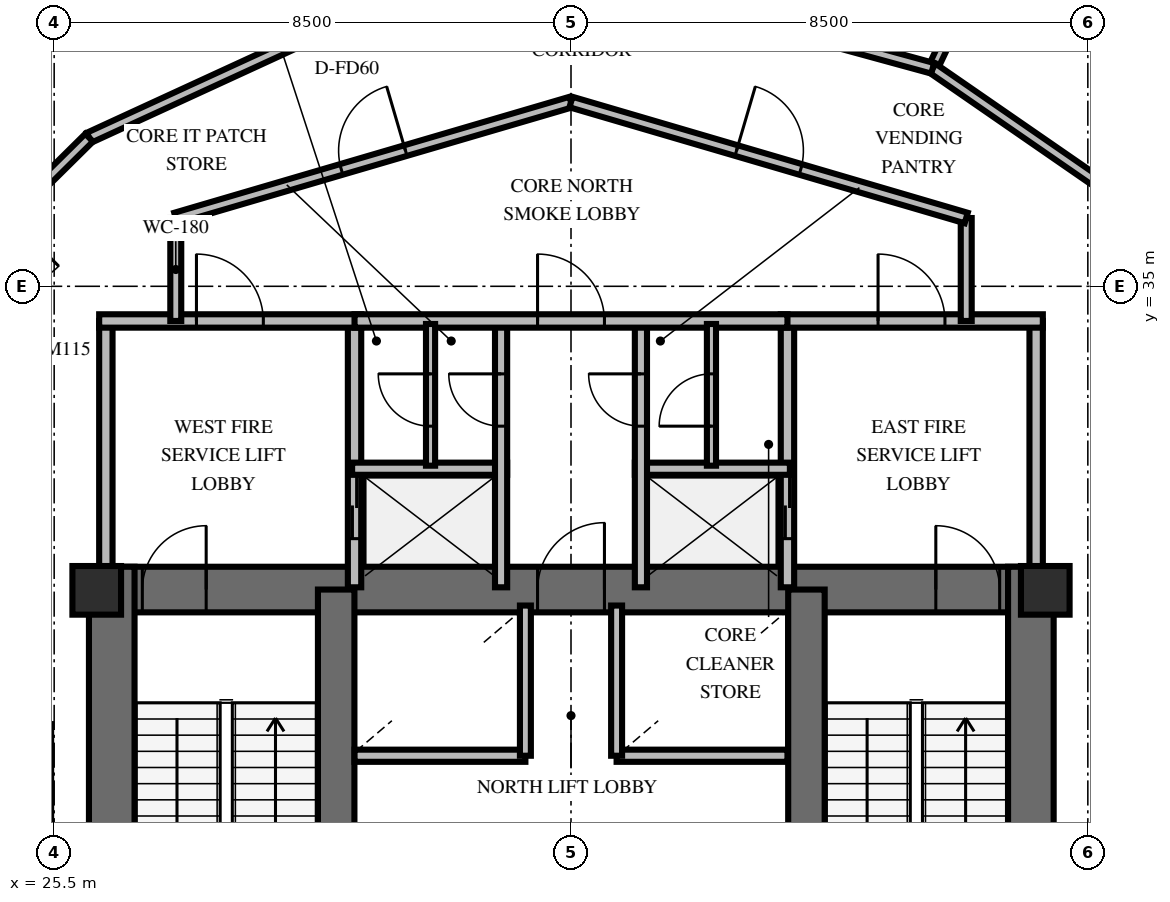
"""IFC4 building model, lengths in metres.
Left out: names, types, materials, properties, quantities, classifications, styles, units other than length and angle.
Written with IfcOpenShell. Run it as: python <this file> out.ifc"""

import sys

from ifc_helpers import new_model, si_unit, direction, frame, frame_2d, origin, origin_2d, place, context, subcontext, project, spatial, rectangle, extrude, element, fill, save


model = new_model("IFC4")
c1 = context("Model", 3, precision=1e-05, world=origin(), true_north=direction((0.0, 1.0)))
c2 = subcontext(c1, "Body", "Model", "MODEL_VIEW")
j1 = project(units=[si_unit("LENGTHUNIT", "METRE"), si_unit("PLANEANGLEUNIT", "RADIAN")], contexts=[c1])
p1 = place(None, origin())
s1 = spatial("IfcSite", under=j1, at=p1, CompositionType="ELEMENT")
p2 = place(p1, origin())
s2 = spatial("IfcBuilding", under=s1, at=p2, CompositionType="ELEMENT")
p3 = place(p2, frame((0.0, 0.0, 137.8)))
s3 = spatial("IfcBuildingStorey", under=s2, at=p3, CompositionType="ELEMENT", Elevation=137.8)
p4 = place(p3, frame((26.072, 30.013, 0.0), z_axis=(0.0, 0.0, 1.0), x_axis=(1.0, 0.0, 0.0)))
e1 = element("IfcWall", 1, at=p4, inside=s3, PredefinedType="SHEAR", context=c2, shape_type="SweptSolid", body=[
    extrude(rectangle(XDim=15.866, YDim=0.75, at=frame_2d((7.933, 0.0))), origin(), (0.0, 0.0, 1.0), 4.0),
])
p5 = place(p4, frame((0.878, 0.0, 0.0)))
e2 = element("IfcOpeningElement", 2, at=p5, cuts=e1, PredefinedType="OPENING", context=c2, shape_type="SweptSolid", body=[
    extrude(rectangle(XDim=1.05, YDim=2.15, at=frame_2d((0.525, 1.075))), frame((0.0, 0.385, 0.0), z_axis=(0.0, -1.0, 0.0), x_axis=(1.0, 0.0, 0.0)), (0.0, 0.0, 1.0), 0.77),
])
p6 = place(p4, frame((13.928, 0.0, 0.0)))
e3 = element("IfcOpeningElement", 3, at=p6, cuts=e1, PredefinedType="OPENING", context=c2, shape_type="SweptSolid", body=[
    extrude(rectangle(XDim=1.05, YDim=2.15, at=frame_2d((0.525, 1.075))), frame((0.0, 0.385, 0.0), z_axis=(0.0, -1.0, 0.0), x_axis=(1.0, 0.0, 0.0)), (0.0, 0.0, 1.0), 0.77),
])
p7 = place(p4, frame((7.378, 0.0, 0.0)))
e4 = element("IfcOpeningElement", 4, at=p7, cuts=e1, PredefinedType="OPENING", context=c2, shape_type="SweptSolid", body=[
    extrude(rectangle(XDim=1.1, YDim=2.15, at=frame_2d((0.55, 1.075))), frame((0.0, 0.385, 0.0), z_axis=(0.0, -1.0, 0.0), x_axis=(1.0, 0.0, 0.0)), (0.0, 0.0, 1.0), 0.77),
])
for number, where, z_axis, x_axis in (
    (5, (26.447, 19.812, 0.0), (0.0, 0.0, 1.0), (0.0, 1.0, 0.0)),
    (6, (41.563, 19.812, 0.0), (0.0, 0.0, 1.0), (0.0, 1.0, 0.0)),
):
    element("IfcWall", number, at=place(p3, frame(where, z_axis=z_axis, x_axis=x_axis)), inside=s3, PredefinedType="SHEAR", context=c2, shape_type="SweptSolid", body=[
        extrude(rectangle(XDim=10.576, YDim=0.75, at=frame_2d((5.288, 0.0))), origin(), (0.0, 0.0, 1.0), 4.0),
    ])
for number, where, z_axis, x_axis in (
    (7, (30.138, 20.187, 0.0), (0.0, 0.0, 1.0), (0.0, 1.0, 0.0)),
    (8, (37.872, 20.187, 0.0), (0.0, 0.0, 1.0), (0.0, 1.0, 0.0)),
):
    element("IfcWall", number, at=place(p3, frame(where, z_axis=z_axis, x_axis=x_axis)), inside=s3, PredefinedType="SHEAR", context=c2, shape_type="SweptSolid", body=[
        extrude(rectangle(XDim=9.826, YDim=0.6, at=frame_2d((4.913, 0.0))), origin(), (0.0, 0.0, 1.0), 4.0),
    ])
for number, where, z_axis, x_axis in (
    (9, (26.2, 30.0, 0.0), (0.0, 0.0, 1.0), (1.0, 0.0, 0.0)),
    (10, (41.8, 30.0, 0.0), (0.0, 0.0, 1.0), (1.0, 0.0, 0.0)),
):
    element("IfcColumn", number, at=place(p3, frame(where, z_axis=z_axis, x_axis=x_axis)), inside=s3, PredefinedType="PILASTER", context=c2, shape_type="SweptSolid", body=[
        extrude(rectangle(XDim=0.8, YDim=0.8, at=origin_2d()), origin(), (0.0, 0.0, 1.0), 4.0),
    ])
p8 = place(p3, frame((26.35, 30.05, 0.0), z_axis=(0.0, 0.0, 1.0), x_axis=(0.0, 1.0, 0.0)))
e11 = element("IfcWall", 11, at=p8, inside=s3, PredefinedType="SOLIDWALL", context=c2, shape_type="SweptSolid", body=[
    extrude(rectangle(XDim=4.38, YDim=0.22, at=frame_2d((2.19, 0.0))), origin(), (0.0, 0.0, 1.0), 2.8),
])
p9 = place(p3, frame((30.44, 30.05, 0.0), z_axis=(0.0, 0.0, 1.0), x_axis=(0.0, 1.0, 0.0)))
e12 = element("IfcWall", 12, at=p9, inside=s3, PredefinedType="SOLIDWALL", context=c2, shape_type="SweptSolid", body=[
    extrude(rectangle(XDim=4.38, YDim=0.22, at=frame_2d((2.19, 0.0))), origin(), (0.0, 0.0, 1.0), 2.8),
])
p10 = place(p9, frame((0.8, 0.0, 0.0)))
e13 = element("IfcOpeningElement", 13, at=p10, cuts=e12, PredefinedType="OPENING", context=c2, shape_type="SweptSolid", body=[
    extrude(rectangle(XDim=1.05, YDim=2.1, at=frame_2d((0.525, 1.05))), frame((0.0, 0.12, 0.0), z_axis=(0.0, -1.0, 0.0), x_axis=(1.0, 0.0, 0.0)), (0.0, 0.0, 1.0), 0.24),
])
p11 = place(p3, frame((26.24, 34.43, 0.0), z_axis=(0.0, 0.0, 1.0), x_axis=(1.0, 0.0, 0.0)))
e14 = element("IfcWall", 14, at=p11, inside=s3, PredefinedType="SOLIDWALL", context=c2, shape_type="SweptSolid", body=[
    extrude(rectangle(XDim=4.31, YDim=0.22, at=frame_2d((2.155, 0.0))), origin(), (0.0, 0.0, 1.0), 2.8),
])
p12 = place(p11, frame((1.6, 0.0, 0.0)))
e15 = element("IfcOpeningElement", 15, at=p12, cuts=e14, PredefinedType="OPENING", context=c2, shape_type="SweptSolid", body=[
    extrude(rectangle(XDim=1.1, YDim=2.15, at=frame_2d((0.55, 1.075))), frame((0.0, 0.12, 0.0), z_axis=(0.0, -1.0, 0.0), x_axis=(1.0, 0.0, 0.0)), (0.0, 0.0, 1.0), 0.24),
])
p13 = place(p3, frame((30.4, 32.0, 0.0), z_axis=(0.0, 0.0, 1.0), x_axis=(1.0, 0.0, 0.0)))
e16 = element("IfcWall", 16, at=p13, inside=s3, PredefinedType="SOLIDWALL", context=c2, shape_type="SweptSolid", body=[
    extrude(rectangle(XDim=2.55, YDim=0.2, at=frame_2d((1.275, 0.0))), origin(), (0.0, 0.0, 1.0), 2.8),
])
p14 = place(p3, frame((32.85, 30.05, 0.0), z_axis=(0.0, 0.0, 1.0), x_axis=(0.0, 1.0, 0.0)))
e17 = element("IfcWall", 17, at=p14, inside=s3, PredefinedType="SOLIDWALL", context=c2, shape_type="SweptSolid", body=[
    extrude(rectangle(XDim=4.38, YDim=0.2, at=frame_2d((2.19, 0.0))), origin(), (0.0, 0.0, 1.0), 2.8),
])
p15 = place(p14, frame((2.65, 0.0, 0.0)))
e18 = element("IfcOpeningElement", 18, at=p15, cuts=e17, PredefinedType="OPENING", context=c2, shape_type="SweptSolid", body=[
    extrude(rectangle(XDim=0.86, YDim=2.05, at=frame_2d((0.43, 1.025))), frame((0.0, 0.11, 0.0), z_axis=(0.0, -1.0, 0.0), x_axis=(1.0, 0.0, 0.0)), (0.0, 0.0, 1.0), 0.22),
])
p16 = place(p3, frame((37.56, 30.05, 0.0), z_axis=(0.0, 0.0, 1.0), x_axis=(0.0, 1.0, 0.0)))
e19 = element("IfcWall", 19, at=p16, inside=s3, PredefinedType="SOLIDWALL", context=c2, shape_type="SweptSolid", body=[
    extrude(rectangle(XDim=4.38, YDim=0.22, at=frame_2d((2.19, 0.0))), origin(), (0.0, 0.0, 1.0), 2.8),
])
p17 = place(p16, frame((0.8, 0.0, 0.0)))
e20 = element("IfcOpeningElement", 20, at=p17, cuts=e19, PredefinedType="OPENING", context=c2, shape_type="SweptSolid", body=[
    extrude(rectangle(XDim=1.05, YDim=2.1, at=frame_2d((0.525, 1.05))), frame((0.0, 0.12, 0.0), z_axis=(0.0, -1.0, 0.0), x_axis=(1.0, 0.0, 0.0)), (0.0, 0.0, 1.0), 0.24),
])
p18 = place(p3, frame((41.65, 30.05, 0.0), z_axis=(0.0, 0.0, 1.0), x_axis=(0.0, 1.0, 0.0)))
e21 = element("IfcWall", 21, at=p18, inside=s3, PredefinedType="SOLIDWALL", context=c2, shape_type="SweptSolid", body=[
    extrude(rectangle(XDim=4.38, YDim=0.22, at=frame_2d((2.19, 0.0))), origin(), (0.0, 0.0, 1.0), 2.8),
])
p19 = place(p3, frame((37.45, 34.43, 0.0), z_axis=(0.0, 0.0, 1.0), x_axis=(1.0, 0.0, 0.0)))
e22 = element("IfcWall", 22, at=p19, inside=s3, PredefinedType="SOLIDWALL", context=c2, shape_type="SweptSolid", body=[
    extrude(rectangle(XDim=4.31, YDim=0.22, at=frame_2d((2.155, 0.0))), origin(), (0.0, 0.0, 1.0), 2.8),
])
p20 = place(p19, frame((1.6, 0.0, 0.0)))
e23 = element("IfcOpeningElement", 23, at=p20, cuts=e22, PredefinedType="OPENING", context=c2, shape_type="SweptSolid", body=[
    extrude(rectangle(XDim=1.1, YDim=2.15, at=frame_2d((0.55, 1.075))), frame((0.0, 0.12, 0.0), z_axis=(0.0, -1.0, 0.0), x_axis=(1.0, 0.0, 0.0)), (0.0, 0.0, 1.0), 0.24),
])
p21 = place(p3, frame((35.05, 32.0, 0.0), z_axis=(0.0, 0.0, 1.0), x_axis=(1.0, 0.0, 0.0)))
e24 = element("IfcWall", 24, at=p21, inside=s3, PredefinedType="SOLIDWALL", context=c2, shape_type="SweptSolid", body=[
    extrude(rectangle(XDim=2.55, YDim=0.2, at=frame_2d((1.275, 0.0))), origin(), (0.0, 0.0, 1.0), 2.8),
])
p22 = place(p3, frame((35.15, 30.05, 0.0), z_axis=(0.0, 0.0, 1.0), x_axis=(0.0, 1.0, 0.0)))
e25 = element("IfcWall", 25, at=p22, inside=s3, PredefinedType="SOLIDWALL", context=c2, shape_type="SweptSolid", body=[
    extrude(rectangle(XDim=4.38, YDim=0.2, at=frame_2d((2.19, 0.0))), origin(), (0.0, 0.0, 1.0), 2.8),
])
p23 = place(p22, frame((2.65, 0.0, 0.0)))
e26 = element("IfcOpeningElement", 26, at=p23, cuts=e25, PredefinedType="OPENING", context=c2, shape_type="SweptSolid", body=[
    extrude(rectangle(XDim=0.86, YDim=2.05, at=frame_2d((0.43, 1.025))), frame((0.0, 0.11, 0.0), z_axis=(0.0, -1.0, 0.0), x_axis=(1.0, 0.0, 0.0)), (0.0, 0.0, 1.0), 0.22),
])
p24 = place(p3, frame((30.44, 34.43, 0.0), z_axis=(0.0, 0.0, 1.0), x_axis=(1.0, 0.0, 0.0)))
e27 = element("IfcWall", 27, at=p24, inside=s3, PredefinedType="SOLIDWALL", context=c2, shape_type="SweptSolid", body=[
    extrude(rectangle(XDim=7.12, YDim=0.22, at=frame_2d((3.56, 0.0))), origin(), (0.0, 0.0, 1.0), 2.8),
])
p25 = place(p24, frame((3.01, 0.0, 0.0)))
e28 = element("IfcOpeningElement", 28, at=p25, cuts=e27, PredefinedType="OPENING", context=c2, shape_type="SweptSolid", body=[
    extrude(rectangle(XDim=1.1, YDim=2.15, at=frame_2d((0.55, 1.075))), frame((0.0, 0.12, 0.0), z_axis=(0.0, -1.0, 0.0), x_axis=(1.0, 0.0, 0.0)), (0.0, 0.0, 1.0), 0.24),
])
p26 = place(p3, frame((31.69, 32.05, 0.0), z_axis=(0.0, 0.0, 1.0), x_axis=(0.0, 1.0, 0.0)))
e29 = element("IfcWall", 29, at=p26, inside=s3, PredefinedType="PARTITIONING", context=c2, shape_type="SweptSolid", body=[
    extrude(rectangle(XDim=2.33, YDim=0.15, at=frame_2d((1.165, 0.0))), origin(), (0.0, 0.0, 1.0), 2.8),
])
p27 = place(p26, frame((0.65, 0.0, 0.0)))
e30 = element("IfcOpeningElement", 30, at=p27, cuts=e29, PredefinedType="OPENING", context=c2, shape_type="SweptSolid", body=[
    extrude(rectangle(XDim=0.86, YDim=2.05, at=frame_2d((0.43, 1.025))), frame((0.0, 0.085, 0.0), z_axis=(0.0, -1.0, 0.0), x_axis=(1.0, 0.0, 0.0)), (0.0, 0.0, 1.0), 0.17),
])
p28 = place(p3, frame((36.31, 32.05, 0.0), z_axis=(0.0, 0.0, 1.0), x_axis=(0.0, 1.0, 0.0)))
e31 = element("IfcWall", 31, at=p28, inside=s3, PredefinedType="PARTITIONING", context=c2, shape_type="SweptSolid", body=[
    extrude(rectangle(XDim=2.33, YDim=0.15, at=frame_2d((1.165, 0.0))), origin(), (0.0, 0.0, 1.0), 2.8),
])
p29 = place(p28, frame((0.65, 0.0, 0.0)))
e32 = element("IfcOpeningElement", 32, at=p29, cuts=e31, PredefinedType="OPENING", context=c2, shape_type="SweptSolid", body=[
    extrude(rectangle(XDim=0.86, YDim=2.05, at=frame_2d((0.43, 1.025))), frame((0.0, 0.085, 0.0), z_axis=(0.0, -1.0, 0.0), x_axis=(1.0, 0.0, 0.0)), (0.0, 0.0, 1.0), 0.17),
])
p30 = place(p3, frame((30.44, 27.28, 0.0), z_axis=(0.0, 0.0, 1.0), x_axis=(1.0, 0.0, 0.0)))
e33 = element("IfcWall", 33, at=p30, inside=s3, PredefinedType="SOLIDWALL", context=c2, shape_type="SweptSolid", body=[
    extrude(rectangle(XDim=2.81, YDim=0.2, at=frame_2d((1.405, 0.0))), origin(), (0.0, 0.0, 1.0), 2.8),
])
p31 = place(p3, frame((33.25, 27.28, 0.0), z_axis=(0.0, 0.0, 1.0), x_axis=(0.0, 1.0, 0.0)))
e34 = element("IfcWall", 34, at=p31, inside=s3, PredefinedType="SOLIDWALL", context=c2, shape_type="SweptSolid", body=[
    extrude(rectangle(XDim=2.47, YDim=0.18, at=frame_2d((1.235, 0.0))), origin(), (0.0, 0.0, 1.0), 2.8),
])
p32 = place(p3, frame((34.75, 27.28, 0.0), z_axis=(0.0, 0.0, 1.0), x_axis=(1.0, 0.0, 0.0)))
e35 = element("IfcWall", 35, at=p32, inside=s3, PredefinedType="SOLIDWALL", context=c2, shape_type="SweptSolid", body=[
    extrude(rectangle(XDim=2.81, YDim=0.2, at=frame_2d((1.405, 0.0))), origin(), (0.0, 0.0, 1.0), 2.8),
])
p33 = place(p3, frame((34.75, 27.28, 0.0), z_axis=(0.0, 0.0, 1.0), x_axis=(0.0, 1.0, 0.0)))
e36 = element("IfcWall", 36, at=p33, inside=s3, PredefinedType="SOLIDWALL", context=c2, shape_type="SweptSolid", body=[
    extrude(rectangle(XDim=2.47, YDim=0.18, at=frame_2d((1.235, 0.0))), origin(), (0.0, 0.0, 1.0), 2.8),
])
for number, where, z_axis, x_axis in (
    (37, (27.5, 34.43, 0.0), (0.0, 0.0, 1.0), (0.0, 1.0, 0.0)),
    (38, (40.5, 36.123, 0.0), (0.0, 0.0, 1.0), (0.0, -1.0, 0.0)),
):
    element("IfcWall", number, at=place(p3, frame(where, z_axis=z_axis, x_axis=x_axis)), inside=s3, PredefinedType="PARTITIONING", context=c2, shape_type="SweptSolid", body=[
        extrude(rectangle(XDim=1.693, YDim=0.18, at=frame_2d((0.846, 0.0))), origin(), (0.0, 0.0, 1.0), 2.8),
    ])
p34 = place(p3, frame((27.5, 36.123, 0.0), z_axis=(0.0, 0.0, 1.0), x_axis=(0.959546654541, 0.281549671923, 0.0)))
e39 = element("IfcWall", 39, at=p34, inside=s3, PredefinedType="PARTITIONING", context=c2, shape_type="SweptSolid", body=[
    extrude(rectangle(XDim=6.774, YDim=0.18, at=frame_2d((3.387, 0.0))), origin(), (0.0, 0.0, 1.0), 2.8),
])
p35 = place(p34, frame((2.837, 0.0, 0.0)))
e40 = element("IfcOpeningElement", 40, at=p35, cuts=e39, PredefinedType="OPENING", context=c2, shape_type="SweptSolid", body=[
    extrude(rectangle(XDim=1.1, YDim=2.15, at=frame_2d((0.55, 1.075))), frame((0.0, 0.1, 0.0), z_axis=(0.0, -1.0, 0.0), x_axis=(1.0, 0.0, 0.0)), (0.0, 0.0, 1.0), 0.2),
])
p36 = place(p3, frame((34.0, 38.03, 0.0), z_axis=(0.0, 0.0, 1.0), x_axis=(0.959546654541, -0.281549671923, 0.0)))
e41 = element("IfcWall", 41, at=p36, inside=s3, PredefinedType="PARTITIONING", context=c2, shape_type="SweptSolid", body=[
    extrude(rectangle(XDim=6.774, YDim=0.18, at=frame_2d((3.387, 0.0))), origin(), (0.0, 0.0, 1.0), 2.8),
])
p37 = place(p36, frame((2.837, 0.0, 0.0)))
e42 = element("IfcOpeningElement", 42, at=p37, cuts=e41, PredefinedType="OPENING", context=c2, shape_type="SweptSolid", body=[
    extrude(rectangle(XDim=1.1, YDim=2.15, at=frame_2d((0.55, 1.075))), frame((0.0, 0.1, 0.0), z_axis=(0.0, -1.0, 0.0), x_axis=(1.0, 0.0, 0.0)), (0.0, 0.0, 1.0), 0.2),
])
p38 = place(p3, frame((39.949, 38.585, 0.0), z_axis=(0.0, 0.0, 1.0), x_axis=(0.427369076024, 0.904077249387, 0.0)))
e43 = element("IfcWall", 43, at=p38, inside=s3, PredefinedType="PARTITIONING", context=c2, shape_type="SweptSolid", body=[
    extrude(rectangle(XDim=8.605, YDim=0.16, at=frame_2d((4.302, 0.0))), origin(), (0.0, 0.0, 1.0), 2.8),
])
p39 = place(p3, frame((43.664, 36.019, 0.0), z_axis=(0.0, 0.0, 1.0), x_axis=(-0.822820444468, 0.568301430726, 0.0)))
e44 = element("IfcWall", 44, at=p39, inside=s3, PredefinedType="PARTITIONING", context=c2, shape_type="SweptSolid", body=[
    extrude(rectangle(XDim=4.515, YDim=0.18, at=frame_2d((2.258, 0.0))), origin(), (0.0, 0.0, 1.0), 2.8),
])
p40 = place(p3, frame((39.949, 38.585, 0.0), z_axis=(0.0, 0.0, 1.0), x_axis=(-0.964543215503, 0.263924961737, 0.0)))
e45 = element("IfcWall", 45, at=p40, inside=s3, PredefinedType="PARTITIONING", context=c2, shape_type="SweptSolid", body=[
    extrude(rectangle(XDim=4.834, YDim=0.18, at=frame_2d((2.417, 0.0))), origin(), (0.0, 0.0, 1.0), 2.8),
])
p41 = place(p3, frame((30.468, 39.464, 0.0), z_axis=(0.0, 0.0, 1.0), x_axis=(-0.90849812175, -0.417888935935, 0.0)))
e46 = element("IfcWall", 46, at=p41, inside=s3, PredefinedType="PARTITIONING", context=c2, shape_type="SweptSolid", body=[
    extrude(rectangle(XDim=4.834, YDim=0.18, at=frame_2d((2.417, 0.0))), origin(), (0.0, 0.0, 1.0), 2.8),
])
p42 = place(p3, frame((26.076, 37.444, 0.0), z_axis=(0.0, 0.0, 1.0), x_axis=(-0.710808900414, -0.703385176907, 0.0)))
e47 = element("IfcWall", 47, at=p42, inside=s3, PredefinedType="PARTITIONING", context=c2, shape_type="SweptSolid", body=[
    extrude(rectangle(XDim=4.834, YDim=0.18, at=frame_2d((2.417, 0.0))), origin(), (0.0, 0.0, 1.0), 2.8),
])
p43 = place(p42, frame((1.842, 0.0, 0.0)))
e48 = element("IfcOpeningElement", 48, at=p43, cuts=e47, PredefinedType="OPENING", context=c2, shape_type="SweptSolid", body=[
    extrude(rectangle(XDim=1.15, YDim=2.15, at=frame_2d((0.575, 1.075))), frame((0.0, 0.1, 0.0), z_axis=(0.0, -1.0, 0.0), x_axis=(1.0, 0.0, 0.0)), (0.0, 0.0, 1.0), 0.2),
])
p44 = place(p5, origin())
e49 = element("IfcDoor", 49, at=p44, inside=s3, OperationType="SINGLE_SWING_RIGHT", PredefinedType="DOOR", context=c2, shape_type="SweptSolid", body=[
    extrude(rectangle(XDim=1.05, YDim=2.15, at=frame_2d((0.525, 1.075))), frame((0.0, 0.025, 0.0), z_axis=(0.0, -1.0, 0.0), x_axis=(1.0, 0.0, 0.0)), (0.0, 0.0, 1.0), 0.05),
])
fill(e2, e49)
p45 = place(p6, origin())
e50 = element("IfcDoor", 50, at=p45, inside=s3, OperationType="SINGLE_SWING_LEFT", PredefinedType="DOOR", context=c2, shape_type="SweptSolid", body=[
    extrude(rectangle(XDim=1.05, YDim=2.15, at=frame_2d((0.525, 1.075))), frame((0.0, 0.025, 0.0), z_axis=(0.0, -1.0, 0.0), x_axis=(1.0, 0.0, 0.0)), (0.0, 0.0, 1.0), 0.05),
])
fill(e3, e50)
p46 = place(p7, origin())
e51 = element("IfcDoor", 51, at=p46, inside=s3, OperationType="SINGLE_SWING_RIGHT", PredefinedType="DOOR", context=c2, shape_type="SweptSolid", body=[
    extrude(rectangle(XDim=1.1, YDim=2.15, at=frame_2d((0.55, 1.075))), frame((0.0, 0.025, 0.0), z_axis=(0.0, -1.0, 0.0), x_axis=(1.0, 0.0, 0.0)), (0.0, 0.0, 1.0), 0.05),
])
fill(e4, e51)
p47 = place(p12, origin())
e52 = element("IfcDoor", 52, at=p47, inside=s3, OperationType="SINGLE_SWING_LEFT", PredefinedType="DOOR", context=c2, shape_type="SweptSolid", body=[
    extrude(rectangle(XDim=1.1, YDim=2.15, at=frame_2d((0.55, 1.075))), frame((0.0, 0.025, 0.0), z_axis=(0.0, -1.0, 0.0), x_axis=(1.0, 0.0, 0.0)), (0.0, 0.0, 1.0), 0.05),
])
fill(e15, e52)
p48 = place(p10, origin())
e53 = element("IfcDoor", 53, at=p48, inside=s3, OperationType="DOUBLE_DOOR_SLIDING", PredefinedType="USERDEFINED", context=c2, shape_type="SweptSolid", body=[
    extrude(rectangle(XDim=1.05, YDim=2.1, at=frame_2d((0.525, 1.05))), frame((0.0, 0.025, 0.0), z_axis=(0.0, -1.0, 0.0), x_axis=(1.0, 0.0, 0.0)), (0.0, 0.0, 1.0), 0.05),
])
fill(e13, e53)
p49 = place(p15, origin())
e54 = element("IfcDoor", 54, at=p49, inside=s3, OperationType="SINGLE_SWING_RIGHT", PredefinedType="TRAPDOOR", context=c2, shape_type="SweptSolid", body=[
    extrude(rectangle(XDim=0.86, YDim=2.05, at=frame_2d((0.43, 1.025))), frame((0.0, 0.025, 0.0), z_axis=(0.0, -1.0, 0.0), x_axis=(1.0, 0.0, 0.0)), (0.0, 0.0, 1.0), 0.05),
])
fill(e18, e54)
p50 = place(p20, origin())
e55 = element("IfcDoor", 55, at=p50, inside=s3, OperationType="SINGLE_SWING_LEFT", PredefinedType="DOOR", context=c2, shape_type="SweptSolid", body=[
    extrude(rectangle(XDim=1.1, YDim=2.15, at=frame_2d((0.55, 1.075))), frame((0.0, 0.025, 0.0), z_axis=(0.0, -1.0, 0.0), x_axis=(1.0, 0.0, 0.0)), (0.0, 0.0, 1.0), 0.05),
])
fill(e23, e55)
p51 = place(p17, origin())
e56 = element("IfcDoor", 56, at=p51, inside=s3, OperationType="DOUBLE_DOOR_SLIDING", PredefinedType="USERDEFINED", context=c2, shape_type="SweptSolid", body=[
    extrude(rectangle(XDim=1.05, YDim=2.1, at=frame_2d((0.525, 1.05))), frame((0.0, 0.025, 0.0), z_axis=(0.0, -1.0, 0.0), x_axis=(1.0, 0.0, 0.0)), (0.0, 0.0, 1.0), 0.05),
])
fill(e20, e56)
p52 = place(p23, origin())
e57 = element("IfcDoor", 57, at=p52, inside=s3, OperationType="SINGLE_SWING_RIGHT", PredefinedType="TRAPDOOR", context=c2, shape_type="SweptSolid", body=[
    extrude(rectangle(XDim=0.86, YDim=2.05, at=frame_2d((0.43, 1.025))), frame((0.0, 0.025, 0.0), z_axis=(0.0, -1.0, 0.0), x_axis=(1.0, 0.0, 0.0)), (0.0, 0.0, 1.0), 0.05),
])
fill(e26, e57)
p53 = place(p25, origin())
e58 = element("IfcDoor", 58, at=p53, inside=s3, OperationType="SINGLE_SWING_LEFT", PredefinedType="DOOR", context=c2, shape_type="SweptSolid", body=[
    extrude(rectangle(XDim=1.1, YDim=2.15, at=frame_2d((0.55, 1.075))), frame((0.0, 0.025, 0.0), z_axis=(0.0, -1.0, 0.0), x_axis=(1.0, 0.0, 0.0)), (0.0, 0.0, 1.0), 0.05),
])
fill(e28, e58)
p54 = place(p27, origin())
e59 = element("IfcDoor", 59, at=p54, inside=s3, OperationType="SINGLE_SWING_RIGHT", PredefinedType="TRAPDOOR", context=c2, shape_type="SweptSolid", body=[
    extrude(rectangle(XDim=0.86, YDim=2.05, at=frame_2d((0.43, 1.025))), frame((0.0, 0.025, 0.0), z_axis=(0.0, -1.0, 0.0), x_axis=(1.0, 0.0, 0.0)), (0.0, 0.0, 1.0), 0.05),
])
fill(e30, e59)
p55 = place(p29, origin())
e60 = element("IfcDoor", 60, at=p55, inside=s3, OperationType="SINGLE_SWING_LEFT", PredefinedType="TRAPDOOR", context=c2, shape_type="SweptSolid", body=[
    extrude(rectangle(XDim=0.86, YDim=2.05, at=frame_2d((0.43, 1.025))), frame((0.0, 0.025, 0.0), z_axis=(0.0, -1.0, 0.0), x_axis=(1.0, 0.0, 0.0)), (0.0, 0.0, 1.0), 0.05),
])
fill(e32, e60)
p56 = place(p35, origin())
e61 = element("IfcDoor", 61, at=p56, inside=s3, OperationType="SINGLE_SWING_RIGHT", PredefinedType="DOOR", context=c2, shape_type="SweptSolid", body=[
    extrude(rectangle(XDim=1.1, YDim=2.15, at=frame_2d((0.55, 1.075))), frame((0.0, 0.025, 0.0), z_axis=(0.0, -1.0, 0.0), x_axis=(1.0, 0.0, 0.0)), (0.0, 0.0, 1.0), 0.05),
])
fill(e40, e61)
p57 = place(p37, origin())
e62 = element("IfcDoor", 62, at=p57, inside=s3, OperationType="SINGLE_SWING_LEFT", PredefinedType="DOOR", context=c2, shape_type="SweptSolid", body=[
    extrude(rectangle(XDim=1.1, YDim=2.15, at=frame_2d((0.55, 1.075))), frame((0.0, 0.025, 0.0), z_axis=(0.0, -1.0, 0.0), x_axis=(1.0, 0.0, 0.0)), (0.0, 0.0, 1.0), 0.05),
])
fill(e42, e62)
save(model, sys.argv[1])
